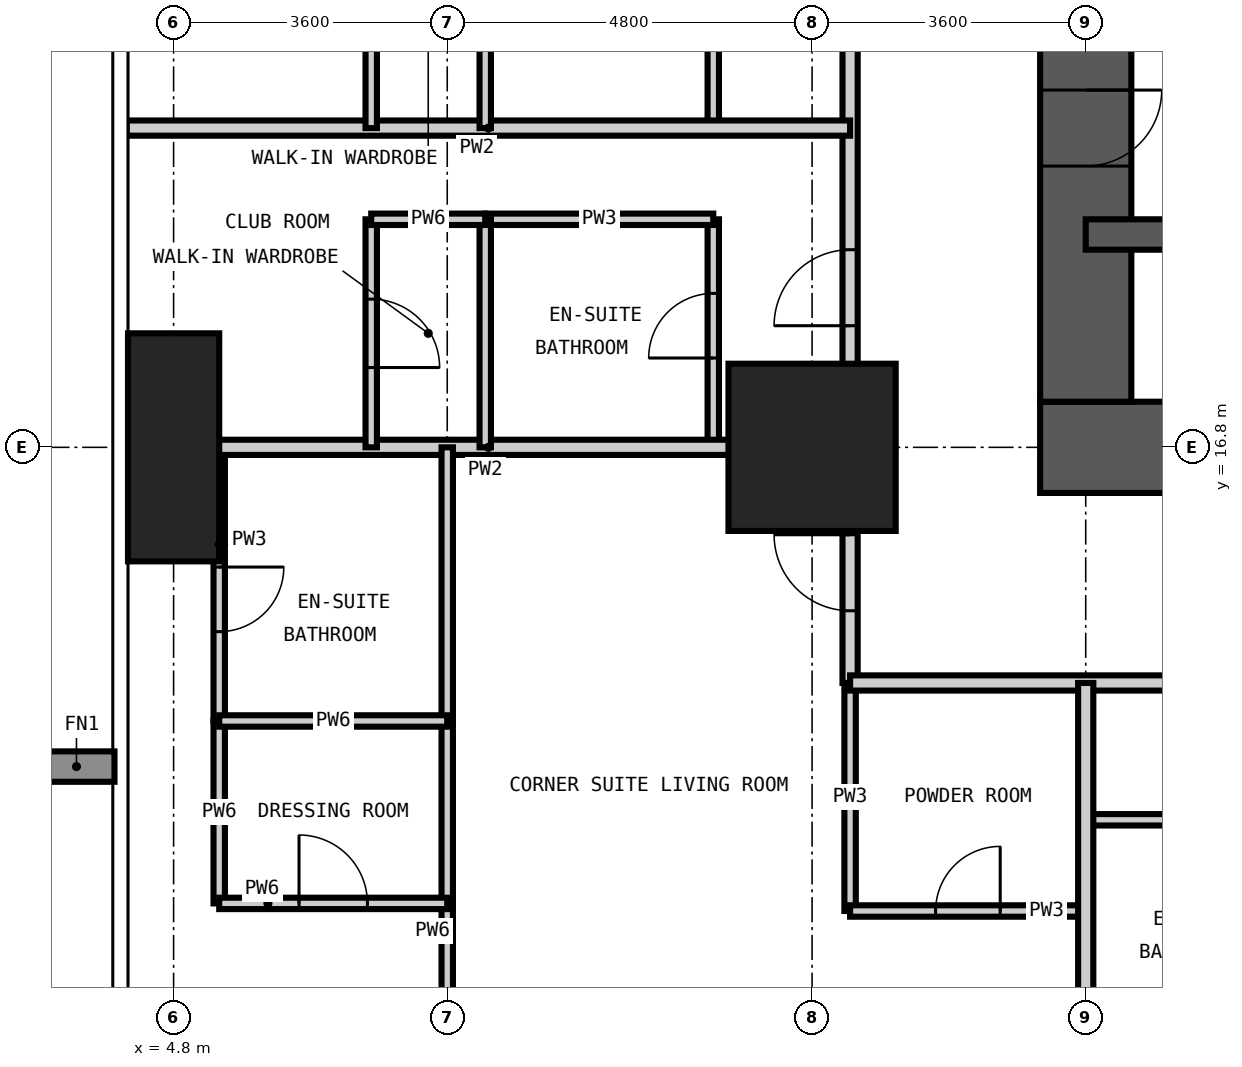
"""IFC4 building model, lengths in metres.
Left out: names, types, materials, properties, quantities, classifications, styles, units other than length and angle.
Written with IfcOpenShell. Run it as: python <this file> out.ifc"""

import sys

from ifc_helpers import new_model, si_unit, direction, frame, frame_2d, origin, origin_2d, place, context, subcontext, project, spatial, rectangle, extrude, element, fill, save


model = new_model("IFC4")
c1 = context("Model", 3, precision=1e-05, world=origin(), true_north=direction((0.0, 1.0)))
c2 = subcontext(c1, "Body", "Model", "MODEL_VIEW")
j1 = project(units=[si_unit("LENGTHUNIT", "METRE"), si_unit("PLANEANGLEUNIT", "RADIAN")], contexts=[c1])
p1 = place(None, origin())
s1 = spatial("IfcSite", under=j1, at=p1, CompositionType="ELEMENT")
p2 = place(p1, origin())
s2 = spatial("IfcBuilding", under=s1, at=p2, CompositionType="ELEMENT")
p3 = place(p2, frame((0.0, 0.0, 162.6)))
s3 = spatial("IfcBuildingStorey", under=s2, at=p3, CompositionType="ELEMENT", Elevation=162.6)
p4 = place(p3, frame((4.8, 16.8, -0.35), z_axis=(0.0, 0.0, 1.0), x_axis=(1.0, 0.0, 0.0)))
e1 = element("IfcColumn", 1, at=p4, inside=s3, PredefinedType="COLUMN", context=c2, shape_type="SweptSolid", body=[
    extrude(rectangle(XDim=1.2, YDim=3.0, at=origin_2d()), origin(), (0.0, 0.0, 1.0), 3.6),
])
p5 = place(p3, frame((13.2, 16.8, -0.35), z_axis=(0.0, 0.0, 1.0), x_axis=(1.0, 0.0, 0.0)))
e2 = element("IfcColumn", 2, at=p5, inside=s3, PredefinedType="COLUMN", context=c2, shape_type="SweptSolid", body=[
    extrude(rectangle(XDim=2.2, YDim=2.2, at=origin_2d()), origin(), (0.0, 0.0, 1.0), 3.6),
])
p6 = place(p3, frame((16.2, 16.8, -0.35), z_axis=(0.0, 0.0, 1.0), x_axis=(1.0, 0.0, 0.0)))
e3 = element("IfcWall", 3, at=p6, inside=s3, PredefinedType="SHEAR", context=c2, shape_type="SweptSolid", body=[
    extrude(rectangle(XDim=26.4, YDim=1.2, at=frame_2d((13.2, 0.0))), origin(), (0.0, 0.0, 1.0), 3.6),
])
p7 = place(p6, frame((12.7, 0.0, 0.35)))
e4 = element("IfcOpeningElement", 4, at=p7, cuts=e3, PredefinedType="OPENING", context=c2, shape_type="SweptSolid", body=[
    extrude(rectangle(XDim=1.0, YDim=2.1, at=frame_2d((0.5, 1.05))), frame((0.0, 0.61, 0.0), z_axis=(0.0, -1.0, 0.0), x_axis=(1.0, 0.0, 0.0)), (0.0, 0.0, 1.0), 1.22),
])
p8 = place(p6, frame((19.0, 0.0, 0.35)))
e5 = element("IfcOpeningElement", 5, at=p8, cuts=e3, PredefinedType="OPENING", context=c2, shape_type="SweptSolid", body=[
    extrude(rectangle(XDim=1.0, YDim=2.1, at=frame_2d((0.5, 1.05))), frame((0.0, 0.61, 0.0), z_axis=(0.0, -1.0, 0.0), x_axis=(1.0, 0.0, 0.0)), (0.0, 0.0, 1.0), 1.22),
])
p9 = place(p3, frame((16.8, 41.4, -0.35), z_axis=(0.0, 0.0, 1.0), x_axis=(0.0, -1.0, 0.0)))
e6 = element("IfcWall", 6, at=p9, inside=s3, PredefinedType="SHEAR", context=c2, shape_type="SweptSolid", body=[
    extrude(rectangle(XDim=24.0, YDim=1.2, at=frame_2d((12.0, 0.0))), origin(), (0.0, 0.0, 1.0), 3.6),
])
p10 = place(p9, frame((11.1, 0.0, 0.35)))
e7 = element("IfcOpeningElement", 7, at=p10, cuts=e6, PredefinedType="OPENING", context=c2, shape_type="SweptSolid", body=[
    extrude(rectangle(XDim=1.8, YDim=2.2, at=frame_2d((0.9, 1.1))), frame((0.0, 0.61, 0.0), z_axis=(0.0, -1.0, 0.0), x_axis=(1.0, 0.0, 0.0)), (0.0, 0.0, 1.0), 1.22),
])
p11 = place(p9, frame((19.9, 0.0, 0.35)))
e8 = element("IfcOpeningElement", 8, at=p11, cuts=e6, PredefinedType="OPENING", context=c2, shape_type="SweptSolid", body=[
    extrude(rectangle(XDim=1.0, YDim=2.1, at=frame_2d((0.5, 1.05))), frame((0.0, 0.61, 0.0), z_axis=(0.0, -1.0, 0.0), x_axis=(1.0, 0.0, 0.0)), (0.0, 0.0, 1.0), 1.22),
])
p12 = place(p9, frame((5.2, 0.0, 0.35)))
e9 = element("IfcOpeningElement", 9, at=p12, cuts=e6, PredefinedType="OPENING", context=c2, shape_type="SweptSolid", body=[
    extrude(rectangle(XDim=1.0, YDim=2.1, at=frame_2d((0.5, 1.05))), frame((0.0, 0.61, 0.0), z_axis=(0.0, -1.0, 0.0), x_axis=(1.0, 0.0, 0.0)), (0.0, 0.0, 1.0), 1.22),
])
p13 = place(p3, frame((16.8, 19.6, -0.35), z_axis=(0.0, 0.0, 1.0), x_axis=(1.0, 0.0, 0.0)))
e10 = element("IfcWall", 10, at=p13, inside=s3, PredefinedType="SHEAR", context=c2, shape_type="SweptSolid", body=[
    extrude(rectangle(XDim=8.4, YDim=0.4, at=frame_2d((4.2, 0.0))), origin(), (0.0, 0.0, 1.0), 3.6),
])
p14 = place(p13, frame((1.6, 0.0, 0.35)))
e11 = element("IfcOpeningElement", 11, at=p14, cuts=e10, PredefinedType="OPENING", context=c2, shape_type="SweptSolid", body=[
    extrude(rectangle(XDim=1.0, YDim=2.1, at=frame_2d((0.5, 1.05))), frame((0.0, 0.21, 0.0), z_axis=(0.0, -1.0, 0.0), x_axis=(1.0, 0.0, 0.0)), (0.0, 0.0, 1.0), 0.42),
])
p15 = place(p13, frame((5.8, 0.0, 0.35)))
e12 = element("IfcOpeningElement", 12, at=p15, cuts=e10, PredefinedType="OPENING", context=c2, shape_type="SweptSolid", body=[
    extrude(rectangle(XDim=1.0, YDim=2.1, at=frame_2d((0.5, 1.05))), frame((0.0, 0.21, 0.0), z_axis=(0.0, -1.0, 0.0), x_axis=(1.0, 0.0, 0.0)), (0.0, 0.0, 1.0), 0.42),
])
p16 = place(p3, frame((5.4, 13.2, 0.0), z_axis=(0.0, 0.0, 1.0), x_axis=(0.0, 1.0, 0.0)))
e13 = element("IfcWall", 13, at=p16, inside=s3, PredefinedType="PARTITIONING", context=c2, shape_type="SweptSolid", body=[
    extrude(rectangle(XDim=3.6, YDim=0.15, at=frame_2d((1.8, 0.0))), origin(), (0.0, 0.0, 1.0), 3.25),
])
p17 = place(p16, frame((1.175, 0.0, 0.0)))
e14 = element("IfcOpeningElement", 14, at=p17, cuts=e13, PredefinedType="OPENING", context=c2, shape_type="SweptSolid", body=[
    extrude(rectangle(XDim=0.85, YDim=2.1, at=frame_2d((0.425, 1.05))), frame((0.0, 0.085, 0.0), z_axis=(0.0, -1.0, 0.0), x_axis=(1.0, 0.0, 0.0)), (0.0, 0.0, 1.0), 0.17),
])
p18 = place(p3, frame((11.9, 16.8, 0.0), z_axis=(0.0, 0.0, 1.0), x_axis=(0.0, 1.0, 0.0)))
e15 = element("IfcWall", 15, at=p18, inside=s3, PredefinedType="PARTITIONING", context=c2, shape_type="SweptSolid", body=[
    extrude(rectangle(XDim=3.0, YDim=0.15, at=frame_2d((1.5, 0.0))), origin(), (0.0, 0.0, 1.0), 3.25),
])
p19 = place(p18, frame((1.175, 0.0, 0.0)))
e16 = element("IfcOpeningElement", 16, at=p19, cuts=e15, PredefinedType="OPENING", context=c2, shape_type="SweptSolid", body=[
    extrude(rectangle(XDim=0.85, YDim=2.1, at=frame_2d((0.425, 1.05))), frame((0.0, 0.085, 0.0), z_axis=(0.0, -1.0, 0.0), x_axis=(1.0, 0.0, 0.0)), (0.0, 0.0, 1.0), 0.17),
])
p20 = place(p3, frame((11.9, 21.0, 0.0), z_axis=(0.0, 0.0, 1.0), x_axis=(0.0, 1.0, 0.0)))
e17 = element("IfcWall", 17, at=p20, inside=s3, PredefinedType="PARTITIONING", context=c2, shape_type="SweptSolid", body=[
    extrude(rectangle(XDim=3.0, YDim=0.15, at=frame_2d((1.5, 0.0))), origin(), (0.0, 0.0, 1.0), 3.25),
])
p21 = place(p20, frame((1.075, 0.0, 0.0)))
e18 = element("IfcOpeningElement", 18, at=p21, cuts=e17, PredefinedType="OPENING", context=c2, shape_type="SweptSolid", body=[
    extrude(rectangle(XDim=0.85, YDim=2.1, at=frame_2d((0.425, 1.05))), frame((0.0, 0.085, 0.0), z_axis=(0.0, -1.0, 0.0), x_axis=(1.0, 0.0, 0.0)), (0.0, 0.0, 1.0), 0.17),
])
p22 = place(p3, frame((13.7, 10.7, 0.0), z_axis=(0.0, 0.0, 1.0), x_axis=(0.0, 1.0, 0.0)))
e19 = element("IfcWall", 19, at=p22, inside=s3, PredefinedType="PARTITIONING", context=c2, shape_type="SweptSolid", body=[
    extrude(rectangle(XDim=3.0, YDim=0.15, at=frame_2d((1.5, 0.0))), origin(), (0.0, 0.0, 1.0), 3.25),
])
p23 = place(p3, frame((13.7, 10.7, 0.0), z_axis=(0.0, 0.0, 1.0), x_axis=(1.0, 0.0, 0.0)))
e20 = element("IfcWall", 20, at=p23, inside=s3, PredefinedType="PARTITIONING", context=c2, shape_type="SweptSolid", body=[
    extrude(rectangle(XDim=3.1, YDim=0.15, at=frame_2d((1.55, 0.0))), origin(), (0.0, 0.0, 1.0), 3.25),
])
p24 = place(p23, frame((1.125, 0.0, 0.0)))
e21 = element("IfcOpeningElement", 21, at=p24, cuts=e20, PredefinedType="OPENING", context=c2, shape_type="SweptSolid", body=[
    extrude(rectangle(XDim=0.85, YDim=2.1, at=frame_2d((0.425, 1.05))), frame((0.0, 0.085, 0.0), z_axis=(0.0, -1.0, 0.0), x_axis=(1.0, 0.0, 0.0)), (0.0, 0.0, 1.0), 0.17),
])
for number, where, z_axis, x_axis in (
    (22, (16.8, 11.9, 0.0), (0.0, 0.0, 1.0), (1.0, 0.0, 0.0)),
    (23, (8.9, 19.8, 0.0), (0.0, 0.0, 1.0), (1.0, 0.0, 0.0)),
):
    element("IfcWall", number, at=place(p3, frame(where, z_axis=z_axis, x_axis=x_axis)), inside=s3, PredefinedType="PARTITIONING", context=c2, shape_type="SweptSolid", body=[
        extrude(rectangle(XDim=3.0, YDim=0.15, at=frame_2d((1.5, 0.0))), origin(), (0.0, 0.0, 1.0), 3.25),
    ])
p25 = place(p3, frame((13.7, 13.7, 0.0), z_axis=(0.0, 0.0, 1.0), x_axis=(0.0, 1.0, 0.0)))
e24 = element("IfcWall", 24, at=p25, inside=s3, PredefinedType="PARTITIONING", context=c2, shape_type="SweptSolid", body=[
    extrude(rectangle(XDim=30.8, YDim=0.2, at=frame_2d((15.4, 0.0))), origin(), (0.0, 0.0, 1.0), 3.25),
])
p26 = place(p25, frame((4.7, 0.0, 0.0)))
e25 = element("IfcOpeningElement", 25, at=p26, cuts=e24, PredefinedType="OPENING", context=c2, shape_type="SweptSolid", body=[
    extrude(rectangle(XDim=1.0, YDim=2.2, at=frame_2d((0.5, 1.1))), frame((0.0, 0.11, 0.0), z_axis=(0.0, -1.0, 0.0), x_axis=(1.0, 0.0, 0.0)), (0.0, 0.0, 1.0), 0.22),
])
p27 = place(p25, frame((8.9, 0.0, 0.0)))
e26 = element("IfcOpeningElement", 26, at=p27, cuts=e24, PredefinedType="OPENING", context=c2, shape_type="SweptSolid", body=[
    extrude(rectangle(XDim=1.0, YDim=2.2, at=frame_2d((0.5, 1.1))), frame((0.0, 0.11, 0.0), z_axis=(0.0, -1.0, 0.0), x_axis=(1.0, 0.0, 0.0)), (0.0, 0.0, 1.0), 0.22),
])
p28 = place(p25, frame((13.1, 0.0, 0.0)))
e27 = element("IfcOpeningElement", 27, at=p28, cuts=e24, PredefinedType="OPENING", context=c2, shape_type="SweptSolid", body=[
    extrude(rectangle(XDim=1.0, YDim=2.2, at=frame_2d((0.5, 1.1))), frame((0.0, 0.11, 0.0), z_axis=(0.0, -1.0, 0.0), x_axis=(1.0, 0.0, 0.0)), (0.0, 0.0, 1.0), 0.22),
])
p29 = place(p25, frame((17.3, 0.0, 0.0)))
e28 = element("IfcOpeningElement", 28, at=p29, cuts=e24, PredefinedType="OPENING", context=c2, shape_type="SweptSolid", body=[
    extrude(rectangle(XDim=1.0, YDim=2.2, at=frame_2d((0.5, 1.1))), frame((0.0, 0.11, 0.0), z_axis=(0.0, -1.0, 0.0), x_axis=(1.0, 0.0, 0.0)), (0.0, 0.0, 1.0), 0.22),
])
p30 = place(p25, frame((21.5, 0.0, 0.0)))
e29 = element("IfcOpeningElement", 29, at=p30, cuts=e24, PredefinedType="OPENING", context=c2, shape_type="SweptSolid", body=[
    extrude(rectangle(XDim=1.0, YDim=2.2, at=frame_2d((0.5, 1.1))), frame((0.0, 0.11, 0.0), z_axis=(0.0, -1.0, 0.0), x_axis=(1.0, 0.0, 0.0)), (0.0, 0.0, 1.0), 0.22),
])
p31 = place(p25, frame((25.7, 0.0, 0.0)))
e30 = element("IfcOpeningElement", 30, at=p31, cuts=e24, PredefinedType="OPENING", context=c2, shape_type="SweptSolid", body=[
    extrude(rectangle(XDim=1.0, YDim=2.2, at=frame_2d((0.5, 1.1))), frame((0.0, 0.11, 0.0), z_axis=(0.0, -1.0, 0.0), x_axis=(1.0, 0.0, 0.0)), (0.0, 0.0, 1.0), 0.22),
])
p32 = place(p25, frame((0.95, 0.0, 0.0)))
e31 = element("IfcOpeningElement", 31, at=p32, cuts=e24, PredefinedType="OPENING", context=c2, shape_type="SweptSolid", body=[
    extrude(rectangle(XDim=1.0, YDim=2.2, at=frame_2d((0.5, 1.1))), frame((0.0, 0.11, 0.0), z_axis=(0.0, -1.0, 0.0), x_axis=(1.0, 0.0, 0.0)), (0.0, 0.0, 1.0), 0.22),
])
p33 = place(p25, frame((29.45, 0.0, 0.0)))
e32 = element("IfcOpeningElement", 32, at=p33, cuts=e24, PredefinedType="OPENING", context=c2, shape_type="SweptSolid", body=[
    extrude(rectangle(XDim=1.0, YDim=2.2, at=frame_2d((0.5, 1.1))), frame((0.0, 0.11, 0.0), z_axis=(0.0, -1.0, 0.0), x_axis=(1.0, 0.0, 0.0)), (0.0, 0.0, 1.0), 0.22),
])
p34 = place(p3, frame((45.7, 13.7, 0.0), z_axis=(0.0, 0.0, 1.0), x_axis=(-1.0, 0.0, 0.0)))
e33 = element("IfcWall", 33, at=p34, inside=s3, PredefinedType="PARTITIONING", context=c2, shape_type="SweptSolid", body=[
    extrude(rectangle(XDim=32.0, YDim=0.2, at=frame_2d((16.0, 0.0))), origin(), (0.0, 0.0, 1.0), 3.25),
])
p35 = place(p34, frame((24.2, 0.0, 0.0)))
e34 = element("IfcOpeningElement", 34, at=p35, cuts=e33, PredefinedType="OPENING", context=c2, shape_type="SweptSolid", body=[
    extrude(rectangle(XDim=1.0, YDim=2.2, at=frame_2d((0.5, 1.1))), frame((0.0, 0.11, 0.0), z_axis=(0.0, -1.0, 0.0), x_axis=(1.0, 0.0, 0.0)), (0.0, 0.0, 1.0), 0.22),
])
p36 = place(p34, frame((15.8, 0.0, 0.0)))
e35 = element("IfcOpeningElement", 35, at=p36, cuts=e33, PredefinedType="OPENING", context=c2, shape_type="SweptSolid", body=[
    extrude(rectangle(XDim=1.0, YDim=2.2, at=frame_2d((0.5, 1.1))), frame((0.0, 0.11, 0.0), z_axis=(0.0, -1.0, 0.0), x_axis=(1.0, 0.0, 0.0)), (0.0, 0.0, 1.0), 0.22),
])
p37 = place(p34, frame((7.4, 0.0, 0.0)))
e36 = element("IfcOpeningElement", 36, at=p37, cuts=e33, PredefinedType="OPENING", context=c2, shape_type="SweptSolid", body=[
    extrude(rectangle(XDim=1.0, YDim=2.2, at=frame_2d((0.5, 1.1))), frame((0.0, 0.11, 0.0), z_axis=(0.0, -1.0, 0.0), x_axis=(1.0, 0.0, 0.0)), (0.0, 0.0, 1.0), 0.22),
])
for number, where, z_axis, x_axis in (
    (37, (16.8, 4.182, 0.0), (0.0, 0.0, 1.0), (0.0, 1.0, 0.0)),
    (38, (4.182, 16.8, 0.0), (0.0, 0.0, 1.0), (1.0, 0.0, 0.0)),
    (39, (4.182, 21.0, 0.0), (0.0, 0.0, 1.0), (1.0, 0.0, 0.0)),
):
    element("IfcWall", number, at=place(p3, frame(where, z_axis=z_axis, x_axis=x_axis)), inside=s3, PredefinedType="PARTITIONING", context=c2, shape_type="SweptSolid", body=[
        extrude(rectangle(XDim=9.518, YDim=0.2, at=frame_2d((4.759, 0.0))), origin(), (0.0, 0.0, 1.0), 3.25),
    ])
p38 = place(p3, frame((5.4, 10.8, 0.0), z_axis=(0.0, 0.0, 1.0), x_axis=(0.0, 1.0, 0.0)))
e40 = element("IfcWall", 40, at=p38, inside=s3, PredefinedType="PARTITIONING", context=c2, shape_type="SweptSolid", body=[
    extrude(rectangle(XDim=2.4, YDim=0.15, at=frame_2d((1.2, 0.0))), origin(), (0.0, 0.0, 1.0), 3.25),
])
p39 = place(p3, frame((7.4, 16.8, 0.0), z_axis=(0.0, 0.0, 1.0), x_axis=(0.0, 1.0, 0.0)))
e41 = element("IfcWall", 41, at=p39, inside=s3, PredefinedType="PARTITIONING", context=c2, shape_type="SweptSolid", body=[
    extrude(rectangle(XDim=3.0, YDim=0.15, at=frame_2d((1.5, 0.0))), origin(), (0.0, 0.0, 1.0), 3.25),
])
p40 = place(p39, frame((1.05, 0.0, 0.0)))
e42 = element("IfcOpeningElement", 42, at=p40, cuts=e41, PredefinedType="OPENING", context=c2, shape_type="SweptSolid", body=[
    extrude(rectangle(XDim=0.9, YDim=2.1, at=frame_2d((0.45, 1.05))), frame((0.0, 0.085, 0.0), z_axis=(0.0, -1.0, 0.0), x_axis=(1.0, 0.0, 0.0)), (0.0, 0.0, 1.0), 0.17),
])
p41 = place(p3, frame((7.4, 21.0, 0.0), z_axis=(0.0, 0.0, 1.0), x_axis=(0.0, 1.0, 0.0)))
e43 = element("IfcWall", 43, at=p41, inside=s3, PredefinedType="PARTITIONING", context=c2, shape_type="SweptSolid", body=[
    extrude(rectangle(XDim=3.0, YDim=0.15, at=frame_2d((1.5, 0.0))), origin(), (0.0, 0.0, 1.0), 3.25),
])
p42 = place(p41, frame((1.05, 0.0, 0.0)))
e44 = element("IfcOpeningElement", 44, at=p42, cuts=e43, PredefinedType="OPENING", context=c2, shape_type="SweptSolid", body=[
    extrude(rectangle(XDim=0.9, YDim=2.1, at=frame_2d((0.45, 1.05))), frame((0.0, 0.085, 0.0), z_axis=(0.0, -1.0, 0.0), x_axis=(1.0, 0.0, 0.0)), (0.0, 0.0, 1.0), 0.17),
])
p43 = place(p3, frame((8.4, 4.182, 0.0), z_axis=(0.0, 0.0, 1.0), x_axis=(0.0, 1.0, 0.0)))
e45 = element("IfcWall", 45, at=p43, inside=s3, PredefinedType="PARTITIONING", context=c2, shape_type="SweptSolid", body=[
    extrude(rectangle(XDim=12.618, YDim=0.15, at=frame_2d((6.309, 0.0))), origin(), (0.0, 0.0, 1.0), 3.25),
])
p44 = place(p43, frame((2.868, 0.0, 0.0)))
e46 = element("IfcOpeningElement", 46, at=p44, cuts=e45, PredefinedType="OPENING", context=c2, shape_type="SweptSolid", body=[
    extrude(rectangle(XDim=0.9, YDim=2.1, at=frame_2d((0.45, 1.05))), frame((0.0, 0.085, 0.0), z_axis=(0.0, -1.0, 0.0), x_axis=(1.0, 0.0, 0.0)), (0.0, 0.0, 1.0), 0.17),
])
for number, where, z_axis, x_axis in (
    (47, (8.9, 16.8, 0.0), (0.0, 0.0, 1.0), (0.0, 1.0, 0.0)),
    (48, (8.9, 21.0, 0.0), (0.0, 0.0, 1.0), (0.0, 1.0, 0.0)),
):
    element("IfcWall", number, at=place(p3, frame(where, z_axis=z_axis, x_axis=x_axis)), inside=s3, PredefinedType="PARTITIONING", context=c2, shape_type="SweptSolid", body=[
        extrude(rectangle(XDim=3.0, YDim=0.15, at=frame_2d((1.5, 0.0))), origin(), (0.0, 0.0, 1.0), 3.25),
    ])
p45 = place(p3, frame((5.4, 10.8, 0.0), z_axis=(0.0, 0.0, 1.0), x_axis=(1.0, 0.0, 0.0)))
e49 = element("IfcWall", 49, at=p45, inside=s3, PredefinedType="PARTITIONING", context=c2, shape_type="SweptSolid", body=[
    extrude(rectangle(XDim=3.0, YDim=0.15, at=frame_2d((1.5, 0.0))), origin(), (0.0, 0.0, 1.0), 3.25),
])
p46 = place(p45, frame((1.05, 0.0, 0.0)))
e50 = element("IfcOpeningElement", 50, at=p46, cuts=e49, PredefinedType="OPENING", context=c2, shape_type="SweptSolid", body=[
    extrude(rectangle(XDim=0.9, YDim=2.1, at=frame_2d((0.45, 1.05))), frame((0.0, 0.085, 0.0), z_axis=(0.0, -1.0, 0.0), x_axis=(1.0, 0.0, 0.0)), (0.0, 0.0, 1.0), 0.17),
])
p47 = place(p3, frame((5.4, 13.2, 0.0), z_axis=(0.0, 0.0, 1.0), x_axis=(1.0, 0.0, 0.0)))
e51 = element("IfcWall", 51, at=p47, inside=s3, PredefinedType="PARTITIONING", context=c2, shape_type="SweptSolid", body=[
    extrude(rectangle(XDim=3.0, YDim=0.15, at=frame_2d((1.5, 0.0))), origin(), (0.0, 0.0, 1.0), 3.25),
])
p48 = place(p3, frame((7.4, 19.8, 0.0), z_axis=(0.0, 0.0, 1.0), x_axis=(1.0, 0.0, 0.0)))
e52 = element("IfcWall", 52, at=p48, inside=s3, PredefinedType="PARTITIONING", context=c2, shape_type="SweptSolid", body=[
    extrude(rectangle(XDim=1.5, YDim=0.15, at=frame_2d((0.75, 0.0))), origin(), (0.0, 0.0, 1.0), 3.25),
])
p49 = place(p26, origin())
e53 = element("IfcDoor", 53, at=p49, inside=s3, OperationType="SINGLE_SWING_LEFT", PredefinedType="DOOR", context=c2, shape_type="SweptSolid", body=[
    extrude(rectangle(XDim=1.0, YDim=2.2, at=frame_2d((0.5, 1.1))), frame((0.0, 0.025, 0.0), z_axis=(0.0, -1.0, 0.0), x_axis=(1.0, 0.0, 0.0)), (0.0, 0.0, 1.0), 0.05),
])
fill(e25, e53)
p50 = place(p19, origin())
e54 = element("IfcDoor", 54, at=p50, inside=s3, OperationType="SINGLE_SWING_LEFT", PredefinedType="DOOR", context=c2, shape_type="SweptSolid", body=[
    extrude(rectangle(XDim=0.85, YDim=2.1, at=frame_2d((0.425, 1.05))), frame((0.0, 0.025, 0.0), z_axis=(0.0, -1.0, 0.0), x_axis=(1.0, 0.0, 0.0)), (0.0, 0.0, 1.0), 0.05),
])
fill(e16, e54)
p51 = place(p40, frame((0.9, 0.0, 0.0), z_axis=(0.0, 0.0, 1.0), x_axis=(-1.0, 0.0, 0.0)))
e55 = element("IfcDoor", 55, at=p51, inside=s3, OperationType="SINGLE_SWING_RIGHT", PredefinedType="DOOR", context=c2, shape_type="SweptSolid", body=[
    extrude(rectangle(XDim=0.9, YDim=2.1, at=frame_2d((0.45, 1.05))), frame((0.0, 0.025, 0.0), z_axis=(0.0, -1.0, 0.0), x_axis=(1.0, 0.0, 0.0)), (0.0, 0.0, 1.0), 0.05),
])
fill(e42, e55)
p52 = place(p32, origin())
e56 = element("IfcDoor", 56, at=p52, inside=s3, OperationType="SINGLE_SWING_RIGHT", PredefinedType="DOOR", context=c2, shape_type="SweptSolid", body=[
    extrude(rectangle(XDim=1.0, YDim=2.2, at=frame_2d((0.5, 1.1))), frame((0.0, 0.025, 0.0), z_axis=(0.0, -1.0, 0.0), x_axis=(1.0, 0.0, 0.0)), (0.0, 0.0, 1.0), 0.05),
])
fill(e31, e56)
p53 = place(p24, origin())
e57 = element("IfcDoor", 57, at=p53, inside=s3, OperationType="SINGLE_SWING_RIGHT", PredefinedType="DOOR", context=c2, shape_type="SweptSolid", body=[
    extrude(rectangle(XDim=0.85, YDim=2.1, at=frame_2d((0.425, 1.05))), frame((0.0, 0.025, 0.0), z_axis=(0.0, -1.0, 0.0), x_axis=(1.0, 0.0, 0.0)), (0.0, 0.0, 1.0), 0.05),
])
fill(e21, e57)
p54 = place(p17, frame((0.85, 0.0, 0.0), z_axis=(0.0, 0.0, 1.0), x_axis=(-1.0, 0.0, 0.0)))
e58 = element("IfcDoor", 58, at=p54, inside=s3, OperationType="SINGLE_SWING_LEFT", PredefinedType="DOOR", context=c2, shape_type="SweptSolid", body=[
    extrude(rectangle(XDim=0.85, YDim=2.1, at=frame_2d((0.425, 1.05))), frame((0.0, 0.025, 0.0), z_axis=(0.0, -1.0, 0.0), x_axis=(1.0, 0.0, 0.0)), (0.0, 0.0, 1.0), 0.05),
])
fill(e14, e58)
p55 = place(p46, origin())
e59 = element("IfcDoor", 59, at=p55, inside=s3, OperationType="SINGLE_SWING_LEFT", PredefinedType="DOOR", context=c2, shape_type="SweptSolid", body=[
    extrude(rectangle(XDim=0.9, YDim=2.1, at=frame_2d((0.45, 1.05))), frame((0.0, 0.025, 0.0), z_axis=(0.0, -1.0, 0.0), x_axis=(1.0, 0.0, 0.0)), (0.0, 0.0, 1.0), 0.05),
])
fill(e50, e59)
p56 = place(p11, origin())
e60 = element("IfcDoor", 60, at=p56, inside=s3, OperationType="SINGLE_SWING_LEFT", PredefinedType="DOOR", context=c2, shape_type="SweptSolid", body=[
    extrude(rectangle(XDim=1.0, YDim=2.1, at=frame_2d((0.5, 1.05))), frame((0.0, 0.025, 0.0), z_axis=(0.0, -1.0, 0.0), x_axis=(1.0, 0.0, 0.0)), (0.0, 0.0, 1.0), 0.05),
])
fill(e8, e60)
save(model, sys.argv[1])
